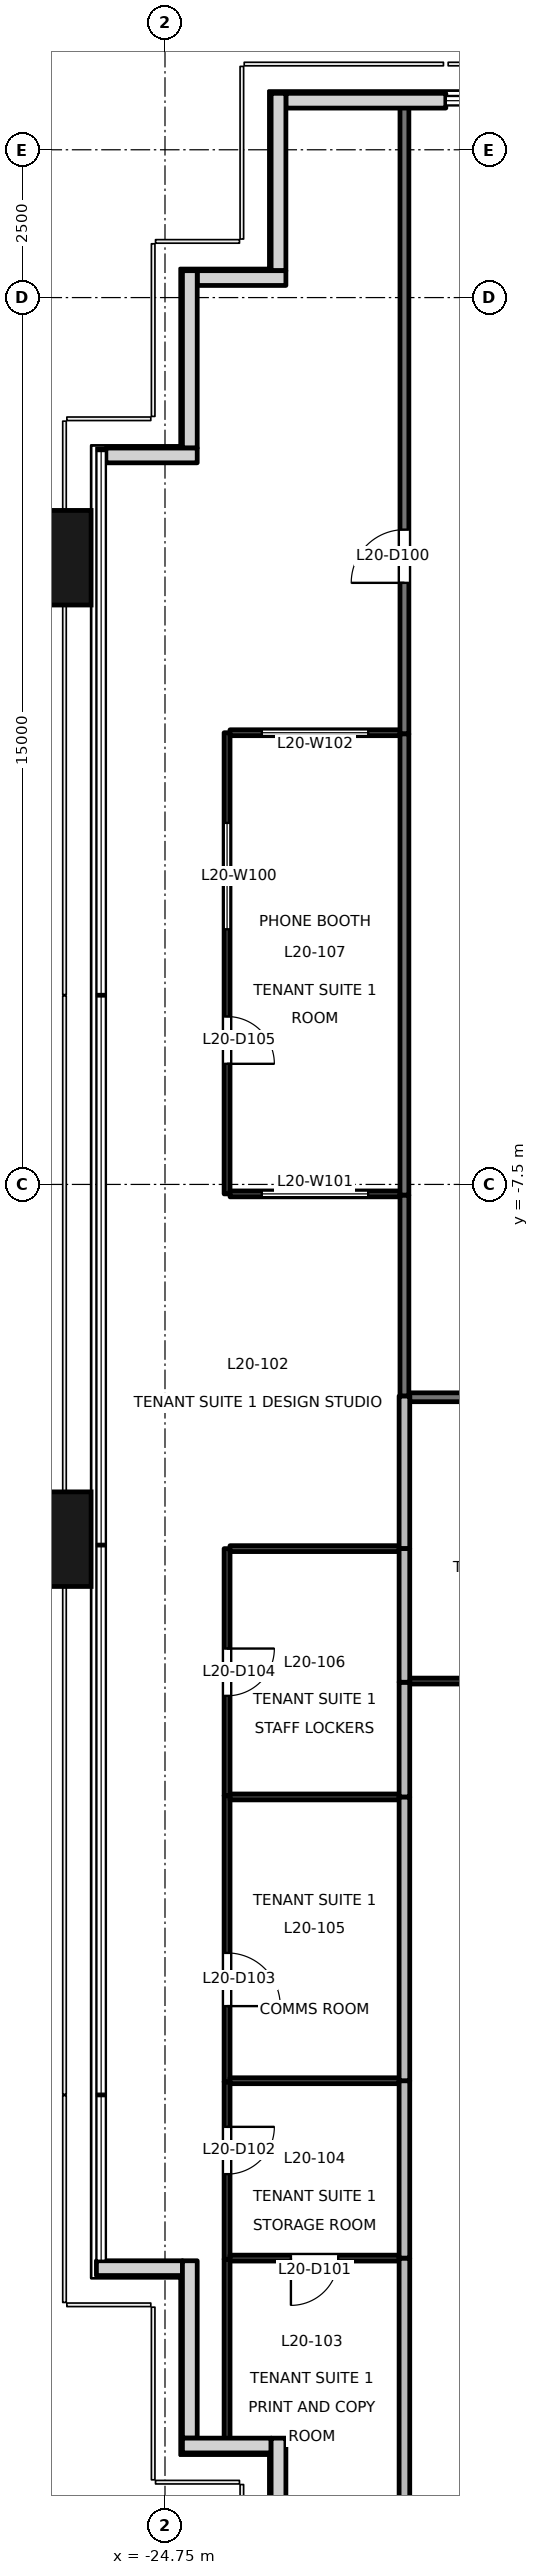
"""IFC4 building model, lengths in metres.
Left out: names, types, materials, properties, quantities, classifications, styles, units other than length and angle.
Written with IfcOpenShell. Run it as: python <this file> out.ifc"""

import sys

from ifc_helpers import new_model, si_unit, direction, frame, frame_2d, origin, origin_2d, place, context, subcontext, project, spatial, rectangle, extrude, element, fill, save


model = new_model("IFC4")
c1 = context("Model", 3, precision=1e-05, world=origin(), true_north=direction((0.0, 1.0)))
c2 = subcontext(c1, "Body", "Model", "MODEL_VIEW")
j1 = project(units=[si_unit("LENGTHUNIT", "METRE"), si_unit("PLANEANGLEUNIT", "RADIAN")], contexts=[c1])
p1 = place(None, origin())
s1 = spatial("IfcSite", under=j1, at=p1, CompositionType="ELEMENT")
p2 = place(p1, origin())
s2 = spatial("IfcBuilding", under=s1, at=p2, CompositionType="ELEMENT")
p3 = place(p2, frame((0.0, 0.0, 91.7)))
s3 = spatial("IfcBuildingStorey", under=s2, at=p3, CompositionType="ELEMENT", Elevation=91.7)
for number, where, z_axis, x_axis in (
    (1, (-26.9, -13.5, -0.2), (0.0, 0.0, 1.0), (0.0, 1.0, 0.0)),
    (2, (-26.9, 3.1, -0.2), (0.0, 0.0, 1.0), (0.0, 1.0, 0.0)),
):
    element("IfcColumn", number, at=place(p3, frame(where, z_axis=z_axis, x_axis=x_axis)), inside=s3, PredefinedType="COLUMN", context=c2, shape_type="SweptSolid", body=[
        extrude(rectangle(XDim=1.6, YDim=1.8, at=origin_2d()), origin(), (0.0, 0.0, 1.0), 4.0),
    ])
p4 = place(p3, frame((-20.0, 10.83, 0.0), z_axis=(0.0, 0.0, 1.0), x_axis=(-1.0, 0.0, 0.0)))
e3 = element("IfcWall", 3, at=p4, inside=s3, PredefinedType="SOLIDWALL", context=c2, shape_type="SweptSolid", body=[
    extrude(rectangle(XDim=2.705, YDim=0.25, at=frame_2d((1.353, 0.0))), origin(), (0.0, 0.0, 1.0), 3.8),
])
p5 = place(p3, frame((-22.83, 10.955, 0.0), z_axis=(0.0, 0.0, 1.0), x_axis=(0.0, -1.0, 0.0)))
e4 = element("IfcWall", 4, at=p5, inside=s3, PredefinedType="SOLIDWALL", context=c2, shape_type="SweptSolid", body=[
    extrude(rectangle(XDim=3.0, YDim=0.25, at=frame_2d((1.5, 0.0))), origin(), (0.0, 0.0, 1.0), 3.8),
])
p6 = place(p3, frame((-22.705, 7.83, 0.0), z_axis=(0.0, 0.0, 1.0), x_axis=(-1.0, 0.0, 0.0)))
e5 = element("IfcWall", 5, at=p6, inside=s3, PredefinedType="SOLIDWALL", context=c2, shape_type="SweptSolid", body=[
    extrude(rectangle(XDim=1.5, YDim=0.25, at=frame_2d((0.75, 0.0))), origin(), (0.0, 0.0, 1.0), 3.8),
])
p7 = place(p3, frame((-24.33, 7.955, 0.0), z_axis=(0.0, 0.0, 1.0), x_axis=(0.0, -1.0, 0.0)))
e6 = element("IfcWall", 6, at=p7, inside=s3, PredefinedType="SOLIDWALL", context=c2, shape_type="SweptSolid", body=[
    extrude(rectangle(XDim=3.0, YDim=0.25, at=frame_2d((1.5, 0.0))), origin(), (0.0, 0.0, 1.0), 3.8),
])
p8 = place(p3, frame((-24.205, 4.83, 0.0), z_axis=(0.0, 0.0, 1.0), x_axis=(-1.0, 0.0, 0.0)))
e7 = element("IfcWall", 7, at=p8, inside=s3, PredefinedType="SOLIDWALL", context=c2, shape_type="SweptSolid", body=[
    extrude(rectangle(XDim=1.545, YDim=0.25, at=frame_2d((0.772, 0.0))), origin(), (0.0, 0.0, 1.0), 3.8),
])
p9 = place(p3, frame((-25.91, -25.83, 0.0), z_axis=(0.0, 0.0, 1.0), x_axis=(1.0, 0.0, 0.0)))
e8 = element("IfcWall", 8, at=p9, inside=s3, PredefinedType="SOLIDWALL", context=c2, shape_type="SweptSolid", body=[
    extrude(rectangle(XDim=1.455, YDim=0.25, at=frame_2d((0.728, 0.0))), origin(), (0.0, 0.0, 1.0), 3.8),
])
p10 = place(p3, frame((-24.33, -25.705, 0.0), z_axis=(0.0, 0.0, 1.0), x_axis=(0.0, -1.0, 0.0)))
e9 = element("IfcWall", 9, at=p10, inside=s3, PredefinedType="SOLIDWALL", context=c2, shape_type="SweptSolid", body=[
    extrude(rectangle(XDim=3.0, YDim=0.25, at=frame_2d((1.5, 0.0))), origin(), (0.0, 0.0, 1.0), 3.8),
])
p11 = place(p3, frame((-24.455, -28.83, 0.0), z_axis=(0.0, 0.0, 1.0), x_axis=(1.0, 0.0, 0.0)))
e10 = element("IfcWall", 10, at=p11, inside=s3, PredefinedType="SOLIDWALL", context=c2, shape_type="SweptSolid", body=[
    extrude(rectangle(XDim=1.5, YDim=0.25, at=frame_2d((0.75, 0.0))), origin(), (0.0, 0.0, 1.0), 3.8),
])
p12 = place(p3, frame((-22.83, -28.705, 0.0), z_axis=(0.0, 0.0, 1.0), x_axis=(0.0, -1.0, 0.0)))
e11 = element("IfcWall", 11, at=p12, inside=s3, PredefinedType="SOLIDWALL", context=c2, shape_type="SweptSolid", body=[
    extrude(rectangle(XDim=3.0, YDim=0.25, at=frame_2d((1.5, 0.0))), origin(), (0.0, 0.0, 1.0), 3.8),
])
p13 = place(p3, frame((-20.7, -11.08, 0.0), z_axis=(0.0, 0.0, 1.0), x_axis=(0.0, 1.0, 0.0)))
e12 = element("IfcWall", 12, at=p13, inside=s3, PredefinedType="PARTITIONING", context=c2, shape_type="SweptSolid", body=[
    extrude(rectangle(XDim=3.4, YDim=0.15, at=frame_2d((1.7, 0.0))), origin(), (0.0, 0.0, 1.0), 3.8),
])
p14 = place(p3, frame((-20.7, 0.12, 0.0), z_axis=(0.0, 0.0, 1.0), x_axis=(0.0, 1.0, 0.0)))
e13 = element("IfcWall", 13, at=p14, inside=s3, PredefinedType="PARTITIONING", context=c2, shape_type="SweptSolid", body=[
    extrude(rectangle(XDim=10.62, YDim=0.15, at=frame_2d((5.31, 0.0))), origin(), (0.0, 0.0, 1.0), 3.4),
])
p15 = place(p14, frame((2.555, 0.0, 0.0)))
e14 = element("IfcOpeningElement", 14, at=p15, cuts=e13, PredefinedType="OPENING", context=c2, shape_type="SweptSolid", body=[
    extrude(rectangle(XDim=0.9, YDim=2.1, at=frame_2d((0.45, 1.05))), frame((0.0, 0.085, 0.0), z_axis=(0.0, -1.0, 0.0), x_axis=(1.0, 0.0, 0.0)), (0.0, 0.0, 1.0), 0.171),
])
p16 = place(p3, frame((-20.7, -7.68, 0.0), z_axis=(0.0, 0.0, 1.0), x_axis=(0.0, 1.0, 0.0)))
e15 = element("IfcWall", 15, at=p16, inside=s3, PredefinedType="PARTITIONING", context=c2, shape_type="SweptSolid", body=[
    extrude(rectangle(XDim=7.8, YDim=0.15, at=frame_2d((3.9, 0.0))), origin(), (0.0, 0.0, 1.0), 3.4),
])
p17 = place(p3, frame((-15.056, -11.1, 0.0), z_axis=(0.0, 0.0, 1.0), x_axis=(-1.0, 0.0, 0.0)))
e16 = element("IfcWall", 16, at=p17, inside=s3, PredefinedType="PARTITIONING", context=c2, shape_type="SweptSolid", body=[
    extrude(rectangle(XDim=5.554, YDim=0.15, at=frame_2d((2.777, 0.0))), origin(), (0.0, 0.0, 1.0), 3.8),
])
p18 = place(p3, frame((-23.7, -25.68, 0.0), z_axis=(0.0, 0.0, 1.0), x_axis=(0.0, -1.0, 0.0)))
e17 = element("IfcWall", 17, at=p18, inside=s3, PredefinedType="PARTITIONING", context=c2, shape_type="SweptSolid", body=[
    extrude(rectangle(XDim=3.06, YDim=0.1, at=frame_2d((1.53, 0.0))), origin(), (0.0, 0.0, 1.0), 3.8),
])
p19 = place(p3, frame((-23.7, -22.68, 0.0), z_axis=(0.0, 0.0, 1.0), x_axis=(0.0, -1.0, 0.0)))
e18 = element("IfcWall", 18, at=p19, inside=s3, PredefinedType="PARTITIONING", context=c2, shape_type="SweptSolid", body=[
    extrude(rectangle(XDim=3.0, YDim=0.1, at=frame_2d((1.5, 0.0))), origin(), (0.0, 0.0, 1.0), 3.8),
])
p20 = place(p19, frame((0.76, 0.0, 0.0)))
e19 = element("IfcOpeningElement", 19, at=p20, cuts=e18, PredefinedType="OPENING", context=c2, shape_type="SweptSolid", body=[
    extrude(rectangle(XDim=0.8, YDim=2.1, at=frame_2d((0.4, 1.05))), frame((0.0, 0.061, 0.0), z_axis=(0.0, -1.0, 0.0), x_axis=(1.0, 0.0, 0.0)), (0.0, 0.0, 1.0), 0.121),
])
p21 = place(p3, frame((-23.7, -17.84, 0.0), z_axis=(0.0, 0.0, 1.0), x_axis=(0.0, -1.0, 0.0)))
e20 = element("IfcWall", 20, at=p21, inside=s3, PredefinedType="PARTITIONING", context=c2, shape_type="SweptSolid", body=[
    extrude(rectangle(XDim=4.84, YDim=0.1, at=frame_2d((2.42, 0.0))), origin(), (0.0, 0.0, 1.0), 3.8),
])
p22 = place(p21, frame((2.658, 0.0, 0.0)))
e21 = element("IfcOpeningElement", 21, at=p22, cuts=e20, PredefinedType="OPENING", context=c2, shape_type="SweptSolid", body=[
    extrude(rectangle(XDim=0.9, YDim=2.1, at=frame_2d((0.45, 1.05))), frame((0.0, 0.061, 0.0), z_axis=(0.0, -1.0, 0.0), x_axis=(1.0, 0.0, 0.0)), (0.0, 0.0, 1.0), 0.121),
])
p23 = place(p3, frame((-23.7, -13.66, 0.0), z_axis=(0.0, 0.0, 1.0), x_axis=(0.0, -1.0, 0.0)))
e22 = element("IfcWall", 22, at=p23, inside=s3, PredefinedType="PARTITIONING", context=c2, shape_type="SweptSolid", body=[
    extrude(rectangle(XDim=4.18, YDim=0.1, at=frame_2d((2.09, 0.0))), origin(), (0.0, 0.0, 1.0), 3.8),
])
p24 = place(p23, frame((1.69, 0.0, 0.0)))
e23 = element("IfcOpeningElement", 23, at=p24, cuts=e22, PredefinedType="OPENING", context=c2, shape_type="SweptSolid", body=[
    extrude(rectangle(XDim=0.8, YDim=2.1, at=frame_2d((0.4, 1.05))), frame((0.0, 0.061, 0.0), z_axis=(0.0, -1.0, 0.0), x_axis=(1.0, 0.0, 0.0)), (0.0, 0.0, 1.0), 0.121),
])
p25 = place(p3, frame((-20.79, -13.66, 0.0), z_axis=(0.0, 0.0, 1.0), x_axis=(-1.0, 0.0, 0.0)))
e24 = element("IfcWall", 24, at=p25, inside=s3, PredefinedType="PARTITIONING", context=c2, shape_type="SweptSolid", body=[
    extrude(rectangle(XDim=2.86, YDim=0.1, at=frame_2d((1.43, 0.0))), origin(), (0.0, 0.0, 1.0), 3.8),
])
p26 = place(p3, frame((-23.7, 0.14, 0.0), z_axis=(0.0, 0.0, 1.0), x_axis=(0.0, -1.0, 0.0)))
e25 = element("IfcWall", 25, at=p26, inside=s3, PredefinedType="PARTITIONING", context=c2, shape_type="SweptSolid", body=[
    extrude(rectangle(XDim=7.8, YDim=0.1, at=frame_2d((3.9, 0.0))), origin(), (0.0, 0.0, 1.0), 3.4),
])
p27 = place(p26, frame((4.8, 0.0, 0.0)))
e26 = element("IfcOpeningElement", 26, at=p27, cuts=e25, PredefinedType="OPENING", context=c2, shape_type="SweptSolid", body=[
    extrude(rectangle(XDim=0.8, YDim=2.1, at=frame_2d((0.4, 1.05))), frame((0.0, 0.061, 0.0), z_axis=(0.0, -1.0, 0.0), x_axis=(1.0, 0.0, 0.0)), (0.0, 0.0, 1.0), 0.121),
])
p28 = place(p26, frame((1.525, 0.0, 0.9)))
e27 = element("IfcOpeningElement", 27, at=p28, cuts=e25, PredefinedType="OPENING", context=c2, shape_type="SweptSolid", body=[
    extrude(rectangle(XDim=1.8, YDim=1.2, at=frame_2d((0.9, 0.6))), frame((0.0, 0.061, 0.0), z_axis=(0.0, -1.0, 0.0), x_axis=(1.0, 0.0, 0.0)), (0.0, 0.0, 1.0), 0.121),
])
p29 = place(p3, frame((-23.65, -7.66, 0.0), z_axis=(0.0, 0.0, 1.0), x_axis=(1.0, 0.0, 0.0)))
e28 = element("IfcWall", 28, at=p29, inside=s3, PredefinedType="PARTITIONING", context=c2, shape_type="SweptSolid", body=[
    extrude(rectangle(XDim=2.875, YDim=0.1, at=frame_2d((1.438, 0.0))), origin(), (0.0, 0.0, 1.0), 3.8),
])
p30 = place(p29, frame((0.537, 0.0, 0.9)))
e29 = element("IfcOpeningElement", 29, at=p30, cuts=e28, PredefinedType="OPENING", context=c2, shape_type="SweptSolid", body=[
    extrude(rectangle(XDim=1.8, YDim=1.2, at=frame_2d((0.9, 0.6))), frame((0.0, 0.061, 0.0), z_axis=(0.0, -1.0, 0.0), x_axis=(1.0, 0.0, 0.0)), (0.0, 0.0, 1.0), 0.121),
])
p31 = place(p3, frame((-20.775, 0.14, 0.0), z_axis=(0.0, 0.0, 1.0), x_axis=(-1.0, 0.0, 0.0)))
e30 = element("IfcWall", 30, at=p31, inside=s3, PredefinedType="PARTITIONING", context=c2, shape_type="SweptSolid", body=[
    extrude(rectangle(XDim=2.875, YDim=0.1, at=frame_2d((1.438, 0.0))), origin(), (0.0, 0.0, 1.0), 3.8),
])
p32 = place(p31, frame((0.537, 0.0, 0.9)))
e31 = element("IfcOpeningElement", 31, at=p32, cuts=e30, PredefinedType="OPENING", context=c2, shape_type="SweptSolid", body=[
    extrude(rectangle(XDim=1.8, YDim=1.2, at=frame_2d((0.9, 0.6))), frame((0.0, 0.061, 0.0), z_axis=(0.0, -1.0, 0.0), x_axis=(1.0, 0.0, 0.0)), (0.0, 0.0, 1.0), 0.121),
])
p33 = place(p3, frame((-20.7, -11.08, 0.0), z_axis=(0.0, 0.0, 1.0), x_axis=(0.0, -1.0, 0.0)))
e32 = element("IfcWall", 32, at=p33, inside=s3, PredefinedType="PARTITIONING", context=c2, shape_type="SweptSolid", body=[
    extrude(rectangle(XDim=2.58, YDim=0.18, at=frame_2d((1.29, 0.0))), origin(), (0.0, 0.0, 1.0), 3.8),
])
p34 = place(p3, frame((-20.79, -25.66, 0.0), z_axis=(0.0, 0.0, 1.0), x_axis=(-1.0, 0.0, 0.0)))
e33 = element("IfcWall", 33, at=p34, inside=s3, PredefinedType="PARTITIONING", context=c2, shape_type="SweptSolid", body=[
    extrude(rectangle(XDim=2.86, YDim=0.1, at=frame_2d((1.43, 0.0))), origin(), (0.0, 0.0, 1.0), 3.8),
])
p35 = place(p34, frame((1.03, 0.0, 0.0)))
e34 = element("IfcOpeningElement", 34, at=p35, cuts=e33, PredefinedType="OPENING", context=c2, shape_type="SweptSolid", body=[
    extrude(rectangle(XDim=0.8, YDim=2.1, at=frame_2d((0.4, 1.05))), frame((0.0, 0.061, 0.0), z_axis=(0.0, -1.0, 0.0), x_axis=(1.0, 0.0, 0.0)), (0.0, 0.0, 1.0), 0.121),
])
p36 = place(p3, frame((-20.7, -25.66, 0.0), z_axis=(0.0, 0.0, 1.0), x_axis=(0.0, -1.0, 0.0)))
e35 = element("IfcWall", 35, at=p36, inside=s3, PredefinedType="PARTITIONING", context=c2, shape_type="SweptSolid", body=[
    extrude(rectangle(XDim=6.08, YDim=0.18, at=frame_2d((3.04, 0.0))), origin(), (0.0, 0.0, 1.0), 3.8),
])
p37 = place(p3, frame((-23.65, -22.66, 0.0), z_axis=(0.0, 0.0, 1.0), x_axis=(1.0, 0.0, 0.0)))
e36 = element("IfcWall", 36, at=p37, inside=s3, PredefinedType="PARTITIONING", context=c2, shape_type="SweptSolid", body=[
    extrude(rectangle(XDim=2.86, YDim=0.1, at=frame_2d((1.43, 0.0))), origin(), (0.0, 0.0, 1.0), 3.8),
])
p38 = place(p3, frame((-20.7, -22.66, 0.0), z_axis=(0.0, 0.0, 1.0), x_axis=(0.0, -1.0, 0.0)))
e37 = element("IfcWall", 37, at=p38, inside=s3, PredefinedType="PARTITIONING", context=c2, shape_type="SweptSolid", body=[
    extrude(rectangle(XDim=3.0, YDim=0.18, at=frame_2d((1.5, 0.0))), origin(), (0.0, 0.0, 1.0), 3.8),
])
p39 = place(p3, frame((-23.65, -17.86, 0.0), z_axis=(0.0, 0.0, 1.0), x_axis=(1.0, 0.0, 0.0)))
e38 = element("IfcWall", 38, at=p39, inside=s3, PredefinedType="PARTITIONING", context=c2, shape_type="SweptSolid", body=[
    extrude(rectangle(XDim=2.86, YDim=0.1, at=frame_2d((1.43, 0.0))), origin(), (0.0, 0.0, 1.0), 3.8),
])
p40 = place(p3, frame((-20.7, -17.86, 0.0), z_axis=(0.0, 0.0, 1.0), x_axis=(0.0, -1.0, 0.0)))
e39 = element("IfcWall", 39, at=p40, inside=s3, PredefinedType="PARTITIONING", context=c2, shape_type="SweptSolid", body=[
    extrude(rectangle(XDim=4.8, YDim=0.18, at=frame_2d((2.4, 0.0))), origin(), (0.0, 0.0, 1.0), 3.8),
])
p41 = place(p3, frame((-20.7, -15.92, 0.0), z_axis=(0.0, 0.0, 1.0), x_axis=(0.0, -1.0, 0.0)))
e40 = element("IfcWall", 40, at=p41, inside=s3, PredefinedType="PARTITIONING", context=c2, shape_type="SweptSolid", body=[
    extrude(rectangle(XDim=1.94, YDim=0.18, at=frame_2d((0.97, 0.0))), origin(), (0.0, 0.0, 1.0), 3.8),
])
p42 = place(p3, frame((-20.7, -13.66, 0.0), z_axis=(0.0, 0.0, 1.0), x_axis=(0.0, -1.0, 0.0)))
e41 = element("IfcWall", 41, at=p42, inside=s3, PredefinedType="PARTITIONING", context=c2, shape_type="SweptSolid", body=[
    extrude(rectangle(XDim=2.26, YDim=0.18, at=frame_2d((1.13, 0.0))), origin(), (0.0, 0.0, 1.0), 3.8),
])
p43 = place(p3, frame((-20.61, -15.9, 0.0), z_axis=(0.0, 0.0, 1.0), x_axis=(1.0, 0.0, 0.0)))
e42 = element("IfcWall", 42, at=p43, inside=s3, PredefinedType="PARTITIONING", context=c2, shape_type="SweptSolid", body=[
    extrude(rectangle(XDim=5.534, YDim=0.1, at=frame_2d((2.767, 0.0))), origin(), (0.0, 0.0, 1.0), 3.8),
])
p44 = place(p43, frame((1.49, 0.0, 0.0)))
e43 = element("IfcOpeningElement", 43, at=p44, cuts=e42, PredefinedType="OPENING", context=c2, shape_type="SweptSolid", body=[
    extrude(rectangle(XDim=0.9, YDim=2.1, at=frame_2d((0.45, 1.05))), frame((0.0, 0.061, 0.0), z_axis=(0.0, -1.0, 0.0), x_axis=(1.0, 0.0, 0.0)), (0.0, 0.0, 1.0), 0.121),
])
p45 = place(p15, origin())
e44 = element("IfcDoor", 44, at=p45, inside=s3, OperationType="SINGLE_SWING_LEFT", PredefinedType="DOOR", context=c2, shape_type="SweptSolid", body=[
    extrude(rectangle(XDim=0.9, YDim=2.1, at=frame_2d((0.45, 1.05))), frame((0.0, 0.025, 0.0), z_axis=(0.0, -1.0, 0.0), x_axis=(1.0, 0.0, 0.0)), (0.0, 0.0, 1.0), 0.05),
])
fill(e14, e44)
p46 = place(p35, origin())
e45 = element("IfcDoor", 45, at=p46, inside=s3, OperationType="SINGLE_SWING_RIGHT", PredefinedType="DOOR", context=c2, shape_type="SweptSolid", body=[
    extrude(rectangle(XDim=0.8, YDim=2.1, at=frame_2d((0.4, 1.05))), frame((0.0, 0.025, 0.0), z_axis=(0.0, -1.0, 0.0), x_axis=(1.0, 0.0, 0.0)), (0.0, 0.0, 1.0), 0.05),
])
fill(e34, e45)
p47 = place(p20, origin())
e46 = element("IfcDoor", 46, at=p47, inside=s3, OperationType="SINGLE_SWING_LEFT", PredefinedType="DOOR", context=c2, shape_type="SweptSolid", body=[
    extrude(rectangle(XDim=0.8, YDim=2.1, at=frame_2d((0.4, 1.05))), frame((0.0, 0.025, 0.0), z_axis=(0.0, -1.0, 0.0), x_axis=(1.0, 0.0, 0.0)), (0.0, 0.0, 1.0), 0.05),
])
fill(e19, e46)
p48 = place(p22, origin())
e47 = element("IfcDoor", 47, at=p48, inside=s3, OperationType="SINGLE_SWING_RIGHT", PredefinedType="DOOR", context=c2, shape_type="SweptSolid", body=[
    extrude(rectangle(XDim=0.9, YDim=2.1, at=frame_2d((0.45, 1.05))), frame((0.0, 0.025, 0.0), z_axis=(0.0, -1.0, 0.0), x_axis=(1.0, 0.0, 0.0)), (0.0, 0.0, 1.0), 0.05),
])
fill(e21, e47)
p49 = place(p24, origin())
e48 = element("IfcDoor", 48, at=p49, inside=s3, OperationType="SINGLE_SWING_LEFT", PredefinedType="DOOR", context=c2, shape_type="SweptSolid", body=[
    extrude(rectangle(XDim=0.8, YDim=2.1, at=frame_2d((0.4, 1.05))), frame((0.0, 0.025, 0.0), z_axis=(0.0, -1.0, 0.0), x_axis=(1.0, 0.0, 0.0)), (0.0, 0.0, 1.0), 0.05),
])
fill(e23, e48)
p50 = place(p27, origin())
e49 = element("IfcDoor", 49, at=p50, inside=s3, OperationType="SINGLE_SWING_RIGHT", PredefinedType="DOOR", context=c2, shape_type="SweptSolid", body=[
    extrude(rectangle(XDim=0.8, YDim=2.1, at=frame_2d((0.4, 1.05))), frame((0.0, 0.025, 0.0), z_axis=(0.0, -1.0, 0.0), x_axis=(1.0, 0.0, 0.0)), (0.0, 0.0, 1.0), 0.05),
])
fill(e26, e49)
p51 = place(p28, origin())
e50 = element("IfcWindow", 50, at=p51, inside=s3, PartitioningType="SINGLE_PANEL", PredefinedType="WINDOW", context=c2, shape_type="SweptSolid", body=[
    extrude(rectangle(XDim=1.8, YDim=1.2, at=frame_2d((0.9, 0.6))), frame((0.0, 0.03, 0.0), z_axis=(0.0, -1.0, 0.0), x_axis=(1.0, 0.0, 0.0)), (0.0, 0.0, 1.0), 0.06),
])
fill(e27, e50)
p52 = place(p30, origin())
e51 = element("IfcWindow", 51, at=p52, inside=s3, PartitioningType="SINGLE_PANEL", PredefinedType="WINDOW", context=c2, shape_type="SweptSolid", body=[
    extrude(rectangle(XDim=1.8, YDim=1.2, at=frame_2d((0.9, 0.6))), frame((0.0, 0.03, 0.0), z_axis=(0.0, -1.0, 0.0), x_axis=(1.0, 0.0, 0.0)), (0.0, 0.0, 1.0), 0.06),
])
fill(e29, e51)
p53 = place(p32, origin())
e52 = element("IfcWindow", 52, at=p53, inside=s3, PartitioningType="SINGLE_PANEL", PredefinedType="WINDOW", context=c2, shape_type="SweptSolid", body=[
    extrude(rectangle(XDim=1.8, YDim=1.2, at=frame_2d((0.9, 0.6))), frame((0.0, 0.03, 0.0), z_axis=(0.0, -1.0, 0.0), x_axis=(1.0, 0.0, 0.0)), (0.0, 0.0, 1.0), 0.06),
])
fill(e31, e52)
save(model, sys.argv[1])
